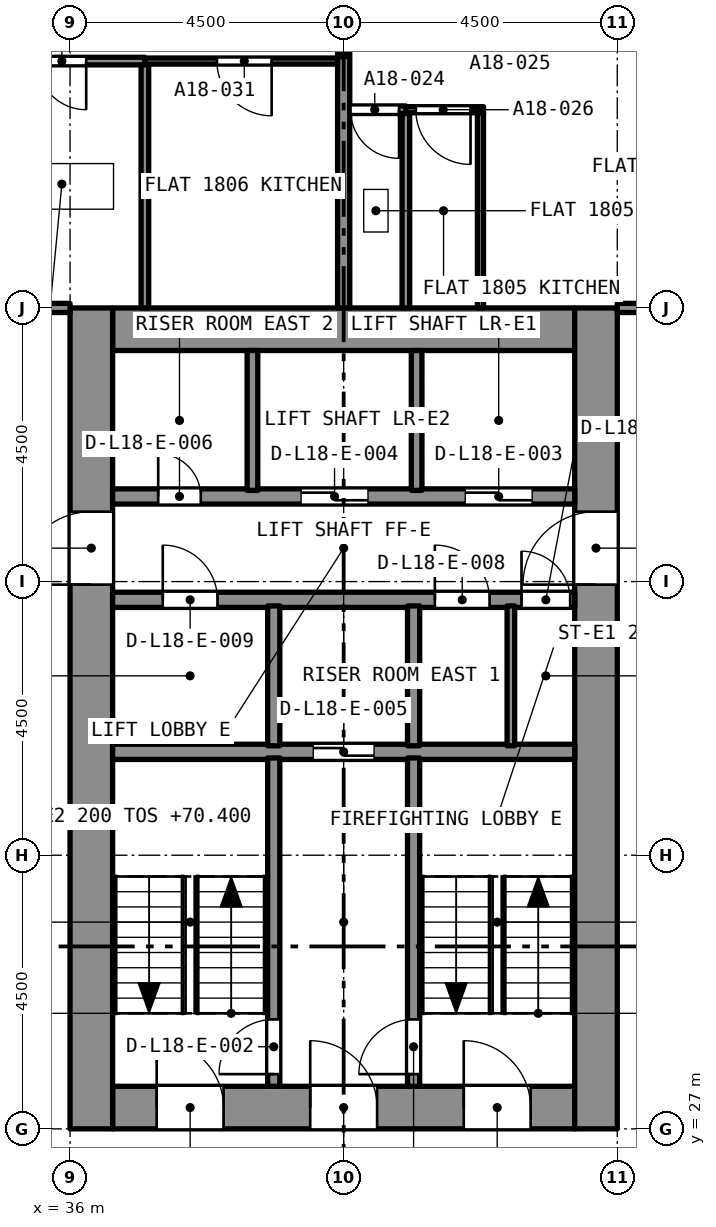
"""IFC4 building model, lengths in metres.
Left out: names, types, materials, properties, quantities, classifications, styles, units other than length and angle.
Written with IfcOpenShell. Run it as: python <this file> out.ifc"""

import sys

from ifc_helpers import new_model, si_unit, direction, frame, frame_2d, origin, place, context, subcontext, project, spatial, rectangle, extrude, element, fill, save


model = new_model("IFC4")
c1 = context("Model", 3, precision=1e-05, world=origin(), true_north=direction((0.0, 1.0)))
c2 = subcontext(c1, "Body", "Model", "MODEL_VIEW")
j1 = project(units=[si_unit("LENGTHUNIT", "METRE"), si_unit("PLANEANGLEUNIT", "RADIAN")], contexts=[c1])
p1 = place(None, origin())
s1 = spatial("IfcSite", under=j1, at=p1, CompositionType="ELEMENT")
p2 = place(p1, origin())
s2 = spatial("IfcBuilding", under=s1, at=p2, CompositionType="ELEMENT")
p3 = place(p2, frame((0.0, 0.0, 68.8)))
s3 = spatial("IfcBuildingStorey", under=s2, at=p3, CompositionType="ELEMENT", Elevation=68.8)
p4 = place(p3, frame((36.7, 27.35, 0.0), z_axis=(0.0, 0.0, 1.0), x_axis=(1.0, 0.0, 0.0)))
e1 = element("IfcWall", 1, at=p4, inside=s3, PredefinedType="SOLIDWALL", context=c2, shape_type="SweptSolid", body=[
    extrude(rectangle(XDim=7.6, YDim=0.7, at=frame_2d((3.8, 0.0))), origin(), (0.0, 0.0, 1.0), 3.2),
])
p5 = place(p4, frame((5.775, 0.0, 0.0)))
e2 = element("IfcOpeningElement", 2, at=p5, cuts=e1, PredefinedType="OPENING", context=c2, shape_type="SweptSolid", body=[
    extrude(rectangle(XDim=1.1, YDim=2.1, at=frame_2d((0.55, 1.05))), frame((0.0, 0.36, 0.0), z_axis=(0.0, -1.0, 0.0), x_axis=(1.0, 0.0, 0.0)), (0.0, 0.0, 1.0), 0.72),
])
p6 = place(p4, frame((3.25, 0.0, 0.0)))
e3 = element("IfcOpeningElement", 3, at=p6, cuts=e1, PredefinedType="OPENING", context=c2, shape_type="SweptSolid", body=[
    extrude(rectangle(XDim=1.1, YDim=2.1, at=frame_2d((0.55, 1.05))), frame((0.0, 0.36, 0.0), z_axis=(0.0, -1.0, 0.0), x_axis=(1.0, 0.0, 0.0)), (0.0, 0.0, 1.0), 0.72),
])
p7 = place(p4, frame((0.725, 0.0, 0.0)))
e4 = element("IfcOpeningElement", 4, at=p7, cuts=e1, PredefinedType="OPENING", context=c2, shape_type="SweptSolid", body=[
    extrude(rectangle(XDim=1.1, YDim=2.1, at=frame_2d((0.55, 1.05))), frame((0.0, 0.36, 0.0), z_axis=(0.0, -1.0, 0.0), x_axis=(1.0, 0.0, 0.0)), (0.0, 0.0, 1.0), 0.72),
])
p8 = place(p3, frame((36.7, 40.15, 0.0), z_axis=(0.0, 0.0, 1.0), x_axis=(1.0, 0.0, 0.0)))
e5 = element("IfcWall", 5, at=p8, inside=s3, PredefinedType="SOLIDWALL", context=c2, shape_type="SweptSolid", body=[
    extrude(rectangle(XDim=7.6, YDim=0.7, at=frame_2d((3.8, 0.0))), origin(), (0.0, 0.0, 1.0), 3.2),
])
p9 = place(p3, frame((36.35, 27.0, 0.0), z_axis=(0.0, 0.0, 1.0), x_axis=(0.0, 1.0, 0.0)))
e6 = element("IfcWall", 6, at=p9, inside=s3, PredefinedType="SOLIDWALL", context=c2, shape_type="SweptSolid", body=[
    extrude(rectangle(XDim=13.5, YDim=0.7, at=frame_2d((6.75, 0.0))), origin(), (0.0, 0.0, 1.0), 3.2),
])
p10 = place(p9, frame((8.95, 0.0, 0.0)))
e7 = element("IfcOpeningElement", 7, at=p10, cuts=e6, PredefinedType="OPENING", context=c2, shape_type="SweptSolid", body=[
    extrude(rectangle(XDim=1.2, YDim=2.1, at=frame_2d((0.6, 1.05))), frame((0.0, 0.36, 0.0), z_axis=(0.0, -1.0, 0.0), x_axis=(1.0, 0.0, 0.0)), (0.0, 0.0, 1.0), 0.72),
])
p11 = place(p3, frame((44.65, 27.0, 0.0), z_axis=(0.0, 0.0, 1.0), x_axis=(0.0, 1.0, 0.0)))
e8 = element("IfcWall", 8, at=p11, inside=s3, PredefinedType="SOLIDWALL", context=c2, shape_type="SweptSolid", body=[
    extrude(rectangle(XDim=13.5, YDim=0.7, at=frame_2d((6.75, 0.0))), origin(), (0.0, 0.0, 1.0), 3.2),
])
p12 = place(p11, frame((8.95, 0.0, 0.0)))
e9 = element("IfcOpeningElement", 9, at=p12, cuts=e8, PredefinedType="OPENING", context=c2, shape_type="SweptSolid", body=[
    extrude(rectangle(XDim=1.2, YDim=2.1, at=frame_2d((0.6, 1.05))), frame((0.0, 0.36, 0.0), z_axis=(0.0, -1.0, 0.0), x_axis=(1.0, 0.0, 0.0)), (0.0, 0.0, 1.0), 0.72),
])
p13 = place(p3, frame((41.523, 43.76, 0.0), z_axis=(0.0, 0.0, 1.0), x_axis=(-1.0, 0.0, 0.0)))
e10 = element("IfcWall", 10, at=p13, inside=s3, PredefinedType="PARTITIONING", context=c2, shape_type="SweptSolid", body=[
    extrude(rectangle(XDim=0.923, YDim=0.125, at=frame_2d((0.461, 0.0))), origin(), (0.0, 0.0, 1.0), 2.9),
])
p14 = place(p13, frame((0.111, 0.0, 0.0)))
e11 = element("IfcOpeningElement", 11, at=p14, cuts=e10, PredefinedType="OPENING", context=c2, shape_type="SweptSolid", body=[
    extrude(rectangle(XDim=0.8, YDim=2.1, at=frame_2d((0.4, 1.05))), frame((0.0, 0.073, 0.0), z_axis=(0.0, -1.0, 0.0), x_axis=(1.0, 0.0, 0.0)), (0.0, 0.0, 1.0), 0.145),
])
p15 = place(p3, frame((41.523, 40.5, 0.0), z_axis=(0.0, 0.0, 1.0), x_axis=(0.0, 1.0, 0.0)))
e12 = element("IfcWall", 12, at=p15, inside=s3, PredefinedType="PARTITIONING", context=c2, shape_type="SweptSolid", body=[
    extrude(rectangle(XDim=3.198, YDim=0.125, at=frame_2d((1.599, 0.0))), origin(), (0.0, 0.0, 1.0), 2.9),
])
p16 = place(p3, frame((40.5, 40.5, 0.0), z_axis=(0.0, 0.0, 1.0), x_axis=(0.0, 1.0, 0.0)))
e13 = element("IfcWall", 13, at=p16, inside=s3, PredefinedType="PARTITIONING", context=c2, shape_type="SweptSolid", body=[
    extrude(rectangle(XDim=8.3, YDim=0.2, at=frame_2d((4.15, 0.0))), origin(), (0.0, 0.0, 1.0), 2.9),
])
p17 = place(p3, frame((42.75, 40.5, 0.0), z_axis=(0.0, 0.0, 1.0), x_axis=(0.0, 1.0, 0.0)))
e14 = element("IfcWall", 14, at=p17, inside=s3, PredefinedType="PARTITIONING", context=c2, shape_type="SweptSolid", body=[
    extrude(rectangle(XDim=3.21, YDim=0.1, at=frame_2d((1.605, 0.0))), origin(), (0.0, 0.0, 1.0), 2.9),
])
p18 = place(p3, frame((42.8, 43.76, 0.0), z_axis=(0.0, 0.0, 1.0), x_axis=(-1.0, 0.0, 0.0)))
e15 = element("IfcWall", 15, at=p18, inside=s3, PredefinedType="PARTITIONING", context=c2, shape_type="SweptSolid", body=[
    extrude(rectangle(XDim=1.277, YDim=0.1, at=frame_2d((0.639, 0.0))), origin(), (0.0, 0.0, 1.0), 2.9),
])
p19 = place(p18, frame((0.214, 0.0, 0.0)))
e16 = element("IfcOpeningElement", 16, at=p19, cuts=e15, PredefinedType="OPENING", context=c2, shape_type="SweptSolid", body=[
    extrude(rectangle(XDim=0.9, YDim=2.1, at=frame_2d((0.45, 1.05))), frame((0.0, 0.06, 0.0), z_axis=(0.0, -1.0, 0.0), x_axis=(1.0, 0.0, 0.0)), (0.0, 0.0, 1.0), 0.12),
])
p20 = place(p3, frame((45.0, 40.5, 0.0), z_axis=(0.0, 0.0, 1.0), x_axis=(1.0, 0.0, 0.0)))
e17 = element("IfcWall", 17, at=p20, inside=s3, PredefinedType="PARTITIONING", context=c2, shape_type="SweptSolid", body=[
    extrude(rectangle(XDim=3.8, YDim=0.15, at=frame_2d((1.9, 0.0))), origin(), (0.0, 0.0, 1.0), 2.9),
])
p21 = place(p20, frame((1.75, 0.0, 0.0)))
e18 = element("IfcOpeningElement", 18, at=p21, cuts=e17, PredefinedType="OPENING", context=c2, shape_type="SweptSolid", body=[
    extrude(rectangle(XDim=1.0, YDim=2.1, at=frame_2d((0.5, 1.05))), frame((0.0, 0.085, 0.0), z_axis=(0.0, -1.0, 0.0), x_axis=(1.0, 0.0, 0.0)), (0.0, 0.0, 1.0), 0.17),
])
p22 = place(p3, frame((37.231, 44.56, 0.0), z_axis=(0.0, 0.0, 1.0), x_axis=(-1.0, 0.0, 0.0)))
e19 = element("IfcWall", 19, at=p22, inside=s3, PredefinedType="PARTITIONING", context=c2, shape_type="SweptSolid", body=[
    extrude(rectangle(XDim=2.794, YDim=0.125, at=frame_2d((1.397, 0.0))), origin(), (0.0, 0.0, 1.0), 2.9),
])
p23 = place(p22, frame((0.966, 0.0, 0.0)))
e20 = element("IfcOpeningElement", 20, at=p23, cuts=e19, PredefinedType="OPENING", context=c2, shape_type="SweptSolid", body=[
    extrude(rectangle(XDim=0.8, YDim=2.1, at=frame_2d((0.4, 1.05))), frame((0.0, 0.073, 0.0), z_axis=(0.0, -1.0, 0.0), x_axis=(1.0, 0.0, 0.0)), (0.0, 0.0, 1.0), 0.145),
])
p24 = place(p3, frame((37.231, 40.5, 0.0), z_axis=(0.0, 0.0, 1.0), x_axis=(0.0, 1.0, 0.0)))
e21 = element("IfcWall", 21, at=p24, inside=s3, PredefinedType="PARTITIONING", context=c2, shape_type="SweptSolid", body=[
    extrude(rectangle(XDim=3.998, YDim=0.125, at=frame_2d((1.999, 0.0))), origin(), (0.0, 0.0, 1.0), 2.9),
])
p25 = place(p3, frame((34.5, 40.5, 0.0), z_axis=(0.0, 0.0, 1.0), x_axis=(1.0, 0.0, 0.0)))
e22 = element("IfcWall", 22, at=p25, inside=s3, PredefinedType="PARTITIONING", context=c2, shape_type="SweptSolid", body=[
    extrude(rectangle(XDim=1.5, YDim=0.15, at=frame_2d((0.75, 0.0))), origin(), (0.0, 0.0, 1.0), 2.9),
])
p26 = place(p3, frame((40.4, 44.56, 0.0), z_axis=(0.0, 0.0, 1.0), x_axis=(-1.0, 0.0, 0.0)))
e23 = element("IfcWall", 23, at=p26, inside=s3, PredefinedType="PARTITIONING", context=c2, shape_type="SweptSolid", body=[
    extrude(rectangle(XDim=3.168, YDim=0.1, at=frame_2d((1.584, 0.0))), origin(), (0.0, 0.0, 1.0), 2.9),
])
p27 = place(p26, frame((1.084, 0.0, 0.0)))
e24 = element("IfcOpeningElement", 24, at=p27, cuts=e23, PredefinedType="OPENING", context=c2, shape_type="SweptSolid", body=[
    extrude(rectangle(XDim=0.9, YDim=2.1, at=frame_2d((0.45, 1.05))), frame((0.0, 0.06, 0.0), z_axis=(0.0, -1.0, 0.0), x_axis=(1.0, 0.0, 0.0)), (0.0, 0.0, 1.0), 0.12),
])
p28 = place(p3, frame((36.7, 33.2, 0.0), z_axis=(0.0, 0.0, 1.0), x_axis=(1.0, 0.0, 0.0)))
e25 = element("IfcWall", 25, at=p28, inside=s3, PredefinedType="SOLIDWALL", context=c2, shape_type="SweptSolid", body=[
    extrude(rectangle(XDim=7.6, YDim=0.25, at=frame_2d((3.8, 0.0))), origin(), (0.0, 0.0, 1.0), 2.9),
])
p29 = place(p28, frame((3.3, 0.0, 0.0)))
e26 = element("IfcOpeningElement", 26, at=p29, cuts=e25, PredefinedType="OPENING", context=c2, shape_type="SweptSolid", body=[
    extrude(rectangle(XDim=1.0, YDim=2.1, at=frame_2d((0.5, 1.05))), frame((0.0, 0.135, 0.0), z_axis=(0.0, -1.0, 0.0), x_axis=(1.0, 0.0, 0.0)), (0.0, 0.0, 1.0), 0.27),
])
p30 = place(p3, frame((36.7, 35.7, 0.0), z_axis=(0.0, 0.0, 1.0), x_axis=(1.0, 0.0, 0.0)))
e27 = element("IfcWall", 27, at=p30, inside=s3, PredefinedType="SOLIDWALL", context=c2, shape_type="SweptSolid", body=[
    extrude(rectangle(XDim=7.6, YDim=0.25, at=frame_2d((3.8, 0.0))), origin(), (0.0, 0.0, 1.0), 2.9),
])
p31 = place(p30, frame((6.725, 0.0, 0.0)))
e28 = element("IfcOpeningElement", 28, at=p31, cuts=e27, PredefinedType="OPENING", context=c2, shape_type="SweptSolid", body=[
    extrude(rectangle(XDim=0.8, YDim=2.1, at=frame_2d((0.4, 1.05))), frame((0.0, 0.135, 0.0), z_axis=(0.0, -1.0, 0.0), x_axis=(1.0, 0.0, 0.0)), (0.0, 0.0, 1.0), 0.27),
])
p32 = place(p30, frame((5.3, 0.0, 0.0)))
e29 = element("IfcOpeningElement", 29, at=p32, cuts=e27, PredefinedType="OPENING", context=c2, shape_type="SweptSolid", body=[
    extrude(rectangle(XDim=0.9, YDim=2.1, at=frame_2d((0.45, 1.05))), frame((0.0, 0.135, 0.0), z_axis=(0.0, -1.0, 0.0), x_axis=(1.0, 0.0, 0.0)), (0.0, 0.0, 1.0), 0.27),
])
p33 = place(p30, frame((0.825, 0.0, 0.0)))
e30 = element("IfcOpeningElement", 30, at=p33, cuts=e27, PredefinedType="OPENING", context=c2, shape_type="SweptSolid", body=[
    extrude(rectangle(XDim=0.9, YDim=2.1, at=frame_2d((0.45, 1.05))), frame((0.0, 0.135, 0.0), z_axis=(0.0, -1.0, 0.0), x_axis=(1.0, 0.0, 0.0)), (0.0, 0.0, 1.0), 0.27),
])
p34 = place(p3, frame((36.7, 37.4, 0.0), z_axis=(0.0, 0.0, 1.0), x_axis=(1.0, 0.0, 0.0)))
e31 = element("IfcWall", 31, at=p34, inside=s3, PredefinedType="SOLIDWALL", context=c2, shape_type="SweptSolid", body=[
    extrude(rectangle(XDim=7.6, YDim=0.25, at=frame_2d((3.8, 0.0))), origin(), (0.0, 0.0, 1.0), 2.9),
])
p35 = place(p34, frame((5.8, 0.0, 0.0)))
e32 = element("IfcOpeningElement", 32, at=p35, cuts=e31, PredefinedType="OPENING", context=c2, shape_type="SweptSolid", body=[
    extrude(rectangle(XDim=1.1, YDim=2.4, at=frame_2d((0.55, 1.2))), frame((0.0, 0.135, 0.0), z_axis=(0.0, -1.0, 0.0), x_axis=(1.0, 0.0, 0.0)), (0.0, 0.0, 1.0), 0.27),
])
p36 = place(p34, frame((3.1, 0.0, 0.0)))
e33 = element("IfcOpeningElement", 33, at=p36, cuts=e31, PredefinedType="OPENING", context=c2, shape_type="SweptSolid", body=[
    extrude(rectangle(XDim=1.1, YDim=2.4, at=frame_2d((0.55, 1.2))), frame((0.0, 0.135, 0.0), z_axis=(0.0, -1.0, 0.0), x_axis=(1.0, 0.0, 0.0)), (0.0, 0.0, 1.0), 0.27),
])
p37 = place(p34, frame((0.75, 0.0, 0.0)))
e34 = element("IfcOpeningElement", 34, at=p37, cuts=e31, PredefinedType="OPENING", context=c2, shape_type="SweptSolid", body=[
    extrude(rectangle(XDim=0.7, YDim=2.1, at=frame_2d((0.35, 1.05))), frame((0.0, 0.135, 0.0), z_axis=(0.0, -1.0, 0.0), x_axis=(1.0, 0.0, 0.0)), (0.0, 0.0, 1.0), 0.27),
])
p38 = place(p3, frame((41.65, 27.7, 0.0), z_axis=(0.0, 0.0, 1.0), x_axis=(0.0, 1.0, 0.0)))
e35 = element("IfcWall", 35, at=p38, inside=s3, PredefinedType="SOLIDWALL", context=c2, shape_type="SweptSolid", body=[
    extrude(rectangle(XDim=5.4, YDim=0.2, at=frame_2d((2.7, 0.0))), origin(), (0.0, 0.0, 1.0), 2.9),
])
p39 = place(p38, frame((0.2, 0.0, 0.0)))
e36 = element("IfcOpeningElement", 36, at=p39, cuts=e35, PredefinedType="OPENING", context=c2, shape_type="SweptSolid", body=[
    extrude(rectangle(XDim=0.9, YDim=2.1, at=frame_2d((0.45, 1.05))), frame((0.0, 0.11, 0.0), z_axis=(0.0, -1.0, 0.0), x_axis=(1.0, 0.0, 0.0)), (0.0, 0.0, 1.0), 0.22),
])
p40 = place(p3, frame((39.35, 27.7, 0.0), z_axis=(0.0, 0.0, 1.0), x_axis=(0.0, 1.0, 0.0)))
e37 = element("IfcWall", 37, at=p40, inside=s3, PredefinedType="SOLIDWALL", context=c2, shape_type="SweptSolid", body=[
    extrude(rectangle(XDim=5.4, YDim=0.2, at=frame_2d((2.7, 0.0))), origin(), (0.0, 0.0, 1.0), 2.9),
])
p41 = place(p40, frame((0.2, 0.0, 0.0)))
e38 = element("IfcOpeningElement", 38, at=p41, cuts=e37, PredefinedType="OPENING", context=c2, shape_type="SweptSolid", body=[
    extrude(rectangle(XDim=0.9, YDim=2.1, at=frame_2d((0.45, 1.05))), frame((0.0, 0.11, 0.0), z_axis=(0.0, -1.0, 0.0), x_axis=(1.0, 0.0, 0.0)), (0.0, 0.0, 1.0), 0.22),
])
for number, where, z_axis, x_axis in (
    (39, (41.65, 33.3, 0.0), (0.0, 0.0, 1.0), (0.0, 1.0, 0.0)),
    (40, (39.35, 33.3, 0.0), (0.0, 0.0, 1.0), (0.0, 1.0, 0.0)),
):
    element("IfcWall", number, at=place(p3, frame(where, z_axis=z_axis, x_axis=x_axis)), inside=s3, PredefinedType="SOLIDWALL", context=c2, shape_type="SweptSolid", body=[
        extrude(rectangle(XDim=2.3, YDim=0.2, at=frame_2d((1.15, 0.0))), origin(), (0.0, 0.0, 1.0), 2.9),
    ])
for number, where, z_axis, x_axis in (
    (41, (41.7, 37.5, 0.0), (0.0, 0.0, 1.0), (0.0, 1.0, 0.0)),
    (42, (39.0, 37.5, 0.0), (0.0, 0.0, 1.0), (0.0, 1.0, 0.0)),
):
    element("IfcWall", number, at=place(p3, frame(where, z_axis=z_axis, x_axis=x_axis)), inside=s3, PredefinedType="SOLIDWALL", context=c2, shape_type="SweptSolid", body=[
        extrude(rectangle(XDim=2.3, YDim=0.175, at=frame_2d((1.15, 0.0))), origin(), (0.0, 0.0, 1.0), 2.9),
    ])
p42 = place(p3, frame((43.25, 33.3, 0.0), z_axis=(0.0, 0.0, 1.0), x_axis=(0.0, 1.0, 0.0)))
e43 = element("IfcWall", 43, at=p42, inside=s3, PredefinedType="PARTITIONING", context=c2, shape_type="SweptSolid", body=[
    extrude(rectangle(XDim=2.3, YDim=0.125, at=frame_2d((1.15, 0.0))), origin(), (0.0, 0.0, 1.0), 2.9),
])
p43 = place(p14, origin())
e44 = element("IfcDoor", 44, at=p43, inside=s3, OperationType="SINGLE_SWING_RIGHT", PredefinedType="DOOR", context=c2, shape_type="SweptSolid", body=[
    extrude(rectangle(XDim=0.8, YDim=2.1, at=frame_2d((0.4, 1.05))), frame((0.0, 0.025, 0.0), z_axis=(0.0, -1.0, 0.0), x_axis=(1.0, 0.0, 0.0)), (0.0, 0.0, 1.0), 0.05),
])
fill(e11, e44)
p44 = place(p19, origin())
e45 = element("IfcDoor", 45, at=p44, inside=s3, OperationType="SINGLE_SWING_RIGHT", PredefinedType="DOOR", context=c2, shape_type="SweptSolid", body=[
    extrude(rectangle(XDim=0.9, YDim=2.1, at=frame_2d((0.45, 1.05))), frame((0.0, 0.025, 0.0), z_axis=(0.0, -1.0, 0.0), x_axis=(1.0, 0.0, 0.0)), (0.0, 0.0, 1.0), 0.05),
])
fill(e16, e45)
p45 = place(p23, origin())
e46 = element("IfcDoor", 46, at=p45, inside=s3, OperationType="SINGLE_SWING_LEFT", PredefinedType="DOOR", context=c2, shape_type="SweptSolid", body=[
    extrude(rectangle(XDim=0.8, YDim=2.1, at=frame_2d((0.4, 1.05))), frame((0.0, 0.025, 0.0), z_axis=(0.0, -1.0, 0.0), x_axis=(1.0, 0.0, 0.0)), (0.0, 0.0, 1.0), 0.05),
])
fill(e20, e46)
p46 = place(p27, origin())
e47 = element("IfcDoor", 47, at=p46, inside=s3, OperationType="SINGLE_SWING_LEFT", PredefinedType="DOOR", context=c2, shape_type="SweptSolid", body=[
    extrude(rectangle(XDim=0.9, YDim=2.1, at=frame_2d((0.45, 1.05))), frame((0.0, 0.025, 0.0), z_axis=(0.0, -1.0, 0.0), x_axis=(1.0, 0.0, 0.0)), (0.0, 0.0, 1.0), 0.05),
])
fill(e24, e47)
p47 = place(p39, origin())
e48 = element("IfcDoor", 48, at=p47, inside=s3, OperationType="SINGLE_SWING_LEFT", PredefinedType="DOOR", context=c2, shape_type="SweptSolid", body=[
    extrude(rectangle(XDim=0.9, YDim=2.1, at=frame_2d((0.45, 1.05))), frame((0.0, 0.025, 0.0), z_axis=(0.0, -1.0, 0.0), x_axis=(1.0, 0.0, 0.0)), (0.0, 0.0, 1.0), 0.05),
])
fill(e36, e48)
p48 = place(p41, origin())
e49 = element("IfcDoor", 49, at=p48, inside=s3, OperationType="SINGLE_SWING_LEFT", PredefinedType="DOOR", context=c2, shape_type="SweptSolid", body=[
    extrude(rectangle(XDim=0.9, YDim=2.1, at=frame_2d((0.45, 1.05))), frame((0.0, 0.025, 0.0), z_axis=(0.0, -1.0, 0.0), x_axis=(1.0, 0.0, 0.0)), (0.0, 0.0, 1.0), 0.05),
])
fill(e38, e49)
p49 = place(p35, origin())
e50 = element("IfcDoor", 50, at=p49, inside=s3, OperationType="SLIDING_TO_LEFT", PredefinedType="DOOR", context=c2, shape_type="SweptSolid", body=[
    extrude(rectangle(XDim=1.1, YDim=2.4, at=frame_2d((0.55, 1.2))), frame((0.0, 0.025, 0.0), z_axis=(0.0, -1.0, 0.0), x_axis=(1.0, 0.0, 0.0)), (0.0, 0.0, 1.0), 0.05),
])
fill(e32, e50)
p50 = place(p36, origin())
e51 = element("IfcDoor", 51, at=p50, inside=s3, OperationType="SLIDING_TO_LEFT", PredefinedType="DOOR", context=c2, shape_type="SweptSolid", body=[
    extrude(rectangle(XDim=1.1, YDim=2.4, at=frame_2d((0.55, 1.2))), frame((0.0, 0.025, 0.0), z_axis=(0.0, -1.0, 0.0), x_axis=(1.0, 0.0, 0.0)), (0.0, 0.0, 1.0), 0.05),
])
fill(e33, e51)
p51 = place(p29, origin())
e52 = element("IfcDoor", 52, at=p51, inside=s3, OperationType="SLIDING_TO_LEFT", PredefinedType="DOOR", context=c2, shape_type="SweptSolid", body=[
    extrude(rectangle(XDim=1.0, YDim=2.1, at=frame_2d((0.5, 1.05))), frame((0.0, 0.025, 0.0), z_axis=(0.0, -1.0, 0.0), x_axis=(1.0, 0.0, 0.0)), (0.0, 0.0, 1.0), 0.05),
])
fill(e26, e52)
p52 = place(p37, origin())
e53 = element("IfcDoor", 53, at=p52, inside=s3, OperationType="SINGLE_SWING_LEFT", PredefinedType="DOOR", context=c2, shape_type="SweptSolid", body=[
    extrude(rectangle(XDim=0.7, YDim=2.1, at=frame_2d((0.35, 1.05))), frame((0.0, 0.025, 0.0), z_axis=(0.0, -1.0, 0.0), x_axis=(1.0, 0.0, 0.0)), (0.0, 0.0, 1.0), 0.05),
])
fill(e34, e53)
p53 = place(p31, origin())
e54 = element("IfcDoor", 54, at=p53, inside=s3, OperationType="SINGLE_SWING_LEFT", PredefinedType="DOOR", context=c2, shape_type="SweptSolid", body=[
    extrude(rectangle(XDim=0.8, YDim=2.1, at=frame_2d((0.4, 1.05))), frame((0.0, 0.025, 0.0), z_axis=(0.0, -1.0, 0.0), x_axis=(1.0, 0.0, 0.0)), (0.0, 0.0, 1.0), 0.05),
])
fill(e28, e54)
p54 = place(p32, origin())
e55 = element("IfcDoor", 55, at=p54, inside=s3, OperationType="SINGLE_SWING_LEFT", PredefinedType="DOOR", context=c2, shape_type="SweptSolid", body=[
    extrude(rectangle(XDim=0.9, YDim=2.1, at=frame_2d((0.45, 1.05))), frame((0.0, 0.025, 0.0), z_axis=(0.0, -1.0, 0.0), x_axis=(1.0, 0.0, 0.0)), (0.0, 0.0, 1.0), 0.05),
])
fill(e29, e55)
p55 = place(p33, origin())
e56 = element("IfcDoor", 56, at=p55, inside=s3, OperationType="SINGLE_SWING_LEFT", PredefinedType="DOOR", context=c2, shape_type="SweptSolid", body=[
    extrude(rectangle(XDim=0.9, YDim=2.1, at=frame_2d((0.45, 1.05))), frame((0.0, 0.025, 0.0), z_axis=(0.0, -1.0, 0.0), x_axis=(1.0, 0.0, 0.0)), (0.0, 0.0, 1.0), 0.05),
])
fill(e30, e56)
p56 = place(p5, origin())
e57 = element("IfcDoor", 57, at=p56, inside=s3, OperationType="SINGLE_SWING_LEFT", PredefinedType="DOOR", context=c2, shape_type="SweptSolid", body=[
    extrude(rectangle(XDim=1.1, YDim=2.1, at=frame_2d((0.55, 1.05))), frame((0.0, 0.025, 0.0), z_axis=(0.0, -1.0, 0.0), x_axis=(1.0, 0.0, 0.0)), (0.0, 0.0, 1.0), 0.05),
])
fill(e2, e57)
p57 = place(p6, origin())
e58 = element("IfcDoor", 58, at=p57, inside=s3, OperationType="SINGLE_SWING_LEFT", PredefinedType="DOOR", context=c2, shape_type="SweptSolid", body=[
    extrude(rectangle(XDim=1.1, YDim=2.1, at=frame_2d((0.55, 1.05))), frame((0.0, 0.025, 0.0), z_axis=(0.0, -1.0, 0.0), x_axis=(1.0, 0.0, 0.0)), (0.0, 0.0, 1.0), 0.05),
])
fill(e3, e58)
p58 = place(p7, origin())
e59 = element("IfcDoor", 59, at=p58, inside=s3, OperationType="SINGLE_SWING_LEFT", PredefinedType="DOOR", context=c2, shape_type="SweptSolid", body=[
    extrude(rectangle(XDim=1.1, YDim=2.1, at=frame_2d((0.55, 1.05))), frame((0.0, 0.025, 0.0), z_axis=(0.0, -1.0, 0.0), x_axis=(1.0, 0.0, 0.0)), (0.0, 0.0, 1.0), 0.05),
])
fill(e4, e59)
p59 = place(p10, origin())
e60 = element("IfcDoor", 60, at=p59, inside=s3, OperationType="SINGLE_SWING_LEFT", PredefinedType="DOOR", context=c2, shape_type="SweptSolid", body=[
    extrude(rectangle(XDim=1.2, YDim=2.1, at=frame_2d((0.6, 1.05))), frame((0.0, 0.025, 0.0), z_axis=(0.0, -1.0, 0.0), x_axis=(1.0, 0.0, 0.0)), (0.0, 0.0, 1.0), 0.05),
])
fill(e7, e60)
p60 = place(p12, origin())
e61 = element("IfcDoor", 61, at=p60, inside=s3, OperationType="SINGLE_SWING_LEFT", PredefinedType="DOOR", context=c2, shape_type="SweptSolid", body=[
    extrude(rectangle(XDim=1.2, YDim=2.1, at=frame_2d((0.6, 1.05))), frame((0.0, 0.025, 0.0), z_axis=(0.0, -1.0, 0.0), x_axis=(1.0, 0.0, 0.0)), (0.0, 0.0, 1.0), 0.05),
])
fill(e9, e61)
save(model, sys.argv[1])
